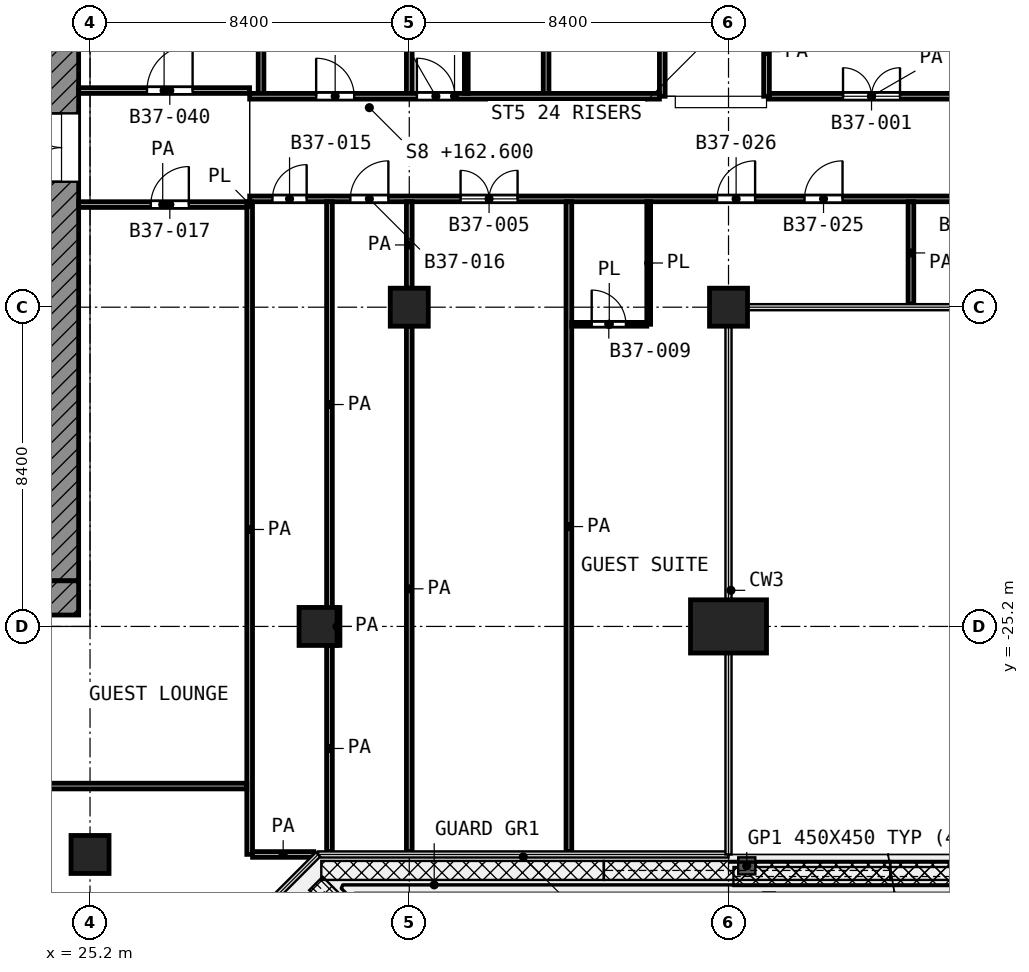
"""IFC4 building model, lengths in metres.
Left out: names, types, materials, properties, quantities, classifications, styles, units other than length and angle.
Written with IfcOpenShell. Run it as: python <this file> out.ifc"""

import sys

from ifc_helpers import new_model, si_unit, direction, frame, frame_2d, origin, origin_2d, place, context, subcontext, project, spatial, rectangle, extrude, element, fill, save


model = new_model("IFC4")
c1 = context("Model", 3, precision=1e-05, world=origin(), true_north=direction((0.0, 1.0)))
c2 = subcontext(c1, "Body", "Model", "MODEL_VIEW")
j1 = project(units=[si_unit("LENGTHUNIT", "METRE"), si_unit("PLANEANGLEUNIT", "RADIAN")], contexts=[c1])
p1 = place(None, origin())
s1 = spatial("IfcSite", under=j1, at=p1, CompositionType="ELEMENT")
p2 = place(p1, origin())
s2 = spatial("IfcBuilding", under=s1, at=p2, CompositionType="ELEMENT")
p3 = place(p2, frame((0.0, 0.0, 162.6)))
s3 = spatial("IfcBuildingStorey", under=s2, at=p3, CompositionType="ELEMENT", Elevation=162.6)
for number, where, z_axis, x_axis in (
    (1, (33.6, -16.8, 0.0), (0.0, 0.0, 1.0), (1.0, 0.0, 0.0)),
    (2, (42.0, -16.8, 0.0), (0.0, 0.0, 1.0), (1.0, 0.0, 0.0)),
    (3, (31.2, -25.2, 0.0), (0.0, 0.0, 1.0), (1.0, 0.0, 0.0)),
):
    element("IfcColumn", number, at=place(p3, frame(where, z_axis=z_axis, x_axis=x_axis)), inside=s3, PredefinedType="COLUMN", context=c2, shape_type="SweptSolid", body=[
        extrude(rectangle(XDim=1.0, YDim=1.0, at=origin_2d()), origin(), (0.0, 0.0, 1.0), 4.2),
    ])
p4 = place(p3, frame((42.0, -25.2, 0.0), z_axis=(0.0, 0.0, 1.0), x_axis=(-1.0, 0.0, 0.0)))
e4 = element("IfcColumn", 4, at=p4, inside=s3, PredefinedType="COLUMN", context=c2, shape_type="SweptSolid", body=[
    extrude(rectangle(XDim=2.0, YDim=1.4, at=origin_2d()), origin(), (0.0, 0.0, 1.0), 4.2),
])
p5 = place(p3, frame((25.2, -31.2, 0.0), z_axis=(0.0, 0.0, 1.0), x_axis=(1.0, 0.0, 0.0)))
e5 = element("IfcColumn", 5, at=p5, inside=s3, PredefinedType="COLUMN", context=c2, shape_type="SweptSolid", body=[
    extrude(rectangle(XDim=1.0, YDim=1.0, at=origin_2d()), origin(), (0.0, 0.0, 1.0), 4.2),
])
p6 = place(p3, frame((24.45, -24.0, 0.0), z_axis=(0.0, 0.0, 1.0), x_axis=(0.0, 1.0, 0.0)))
e6 = element("IfcWall", 6, at=p6, inside=s3, PredefinedType="SHEAR", context=c2, shape_type="SweptSolid", body=[
    extrude(rectangle(XDim=18.6, YDim=0.9, at=frame_2d((9.3, 0.0))), origin(), (0.0, 0.0, 1.0), 3.6),
])
p7 = place(p6, frame((10.5, 0.0, 0.0)))
e7 = element("IfcOpeningElement", 7, at=p7, cuts=e6, PredefinedType="OPENING", context=c2, shape_type="SweptSolid", body=[
    extrude(rectangle(XDim=1.8, YDim=2.1, at=frame_2d((0.9, 1.05))), frame((0.0, 0.46, 0.0), z_axis=(0.0, -1.0, 0.0), x_axis=(1.0, 0.0, 0.0)), (0.0, 0.0, 1.0), 0.92),
])
p8 = place(p3, frame((24.45, -24.9, 0.0), z_axis=(0.0, 0.0, 1.0), x_axis=(0.0, 1.0, 0.0)))
e8 = element("IfcWall", 8, at=p8, inside=s3, PredefinedType="SHEAR", context=c2, shape_type="SweptSolid", body=[
    extrude(rectangle(XDim=0.9, YDim=0.9, at=frame_2d((0.45, 0.0))), origin(), (0.0, 0.0, 1.0), 3.6),
])
p9 = place(p3, frame((37.875, -17.25, 0.0), z_axis=(0.0, 0.0, 1.0), x_axis=(1.0, 0.0, 0.0)))
e9 = element("IfcWall", 9, at=p9, inside=s3, PredefinedType="PARTITIONING", context=c2, shape_type="SweptSolid", body=[
    extrude(rectangle(XDim=1.975, YDim=0.1, at=frame_2d((0.988, 0.0))), origin(), (0.0, 0.0, 1.0), 3.6),
])
p10 = place(p9, frame((0.525, 0.0, 0.0)))
e10 = element("IfcOpeningElement", 10, at=p10, cuts=e9, PredefinedType="OPENING", context=c2, shape_type="SweptSolid", body=[
    extrude(rectangle(XDim=0.9, YDim=2.1, at=frame_2d((0.45, 1.05))), frame((0.0, 0.06, 0.0), z_axis=(0.0, -1.0, 0.0), x_axis=(1.0, 0.0, 0.0)), (0.0, 0.0, 1.0), 0.12),
])
p11 = place(p3, frame((29.4, -14.147, 0.0), z_axis=(0.0, 0.0, 1.0), x_axis=(0.0, 1.0, 0.0)))
e11 = element("IfcWall", 11, at=p11, inside=s3, PredefinedType="PARTITIONING", context=c2, shape_type="SweptSolid", body=[
    extrude(rectangle(XDim=0.12, YDim=0.1, at=frame_2d((0.06, 0.0))), origin(), (0.0, 0.0, 1.0), 3.6),
])
for number, where, z_axis, x_axis in (
    (12, (35.1, -11.175, 0.0), (0.0, 0.0, 1.0), (0.0, 1.0, 0.0)),
    (13, (39.9, -17.25, 0.0), (0.0, 0.0, 1.0), (0.0, 1.0, 0.0)),
):
    element("IfcWall", number, at=place(p3, frame(where, z_axis=z_axis, x_axis=x_axis)), inside=s3, PredefinedType="PARTITIONING", context=c2, shape_type="SweptSolid", body=[
        extrude(rectangle(XDim=3.225, YDim=0.1, at=frame_2d((1.613, 0.0))), origin(), (0.0, 0.0, 1.0), 3.6),
    ])
p12 = place(p3, frame((29.477, -31.2, 0.0), z_axis=(0.0, 0.0, 1.0), x_axis=(1.0, 0.0, 0.0)))
e14 = element("IfcWall", 14, at=p12, inside=s3, PredefinedType="PARTITIONING", context=c2, shape_type="SweptSolid", body=[
    extrude(rectangle(XDim=1.61, YDim=0.15, at=frame_2d((0.805, 0.0))), origin(), (0.0, 0.0, 1.0), 3.6),
])
p13 = place(p3, frame((14.175, -29.4, 0.0), z_axis=(0.0, 0.0, 1.0), x_axis=(1.0, 0.0, 0.0)))
e15 = element("IfcWall", 15, at=p13, inside=s3, PredefinedType="PARTITIONING", context=c2, shape_type="SweptSolid", body=[
    extrude(rectangle(XDim=15.15, YDim=0.15, at=frame_2d((7.575, 0.0))), origin(), (0.0, 0.0, 1.0), 3.6),
])
p14 = place(p3, frame((24.9, -14.1, 0.0), z_axis=(0.0, 0.0, 1.0), x_axis=(1.0, 0.0, 0.0)))
e16 = element("IfcWall", 16, at=p14, inside=s3, PredefinedType="PARTITIONING", context=c2, shape_type="SweptSolid", body=[
    extrude(rectangle(XDim=4.425, YDim=0.15, at=frame_2d((2.212, 0.0))), origin(), (0.0, 0.0, 1.0), 3.6),
])
p15 = place(p14, frame((1.9, 0.0, 0.0)))
e17 = element("IfcOpeningElement", 17, at=p15, cuts=e16, PredefinedType="OPENING", context=c2, shape_type="SweptSolid", body=[
    extrude(rectangle(XDim=1.0, YDim=2.1, at=frame_2d((0.5, 1.05))), frame((0.0, 0.085, 0.0), z_axis=(0.0, -1.0, 0.0), x_axis=(1.0, 0.0, 0.0)), (0.0, 0.0, 1.0), 0.17),
])
p16 = place(p3, frame((29.4, -13.95, 0.0), z_axis=(0.0, 0.0, 1.0), x_axis=(1.0, 0.0, 0.0)))
e18 = element("IfcWall", 18, at=p16, inside=s3, PredefinedType="PARTITIONING", context=c2, shape_type="SweptSolid", body=[
    extrude(rectangle(XDim=37.72, YDim=0.15, at=frame_2d((18.86, 0.0))), origin(), (0.0, 0.0, 1.0), 3.6),
])
p17 = place(p16, frame((14.6, 0.0, 0.0)))
e19 = element("IfcOpeningElement", 19, at=p17, cuts=e18, PredefinedType="OPENING", context=c2, shape_type="SweptSolid", body=[
    extrude(rectangle(XDim=1.0, YDim=2.1, at=frame_2d((0.5, 1.05))), frame((0.0, 0.085, 0.0), z_axis=(0.0, -1.0, 0.0), x_axis=(1.0, 0.0, 0.0)), (0.0, 0.0, 1.0), 0.17),
])
p18 = place(p16, frame((12.3, 0.0, 0.0)))
e20 = element("IfcOpeningElement", 20, at=p18, cuts=e18, PredefinedType="OPENING", context=c2, shape_type="SweptSolid", body=[
    extrude(rectangle(XDim=1.0, YDim=2.1, at=frame_2d((0.5, 1.05))), frame((0.0, 0.085, 0.0), z_axis=(0.0, -1.0, 0.0), x_axis=(1.0, 0.0, 0.0)), (0.0, 0.0, 1.0), 0.17),
])
p19 = place(p16, frame((18.7, 0.0, 0.0)))
e21 = element("IfcOpeningElement", 21, at=p19, cuts=e18, PredefinedType="OPENING", context=c2, shape_type="SweptSolid", body=[
    extrude(rectangle(XDim=1.0, YDim=2.1, at=frame_2d((0.5, 1.05))), frame((0.0, 0.085, 0.0), z_axis=(0.0, -1.0, 0.0), x_axis=(1.0, 0.0, 0.0)), (0.0, 0.0, 1.0), 0.17),
])
p20 = place(p16, frame((22.6, 0.0, 0.0)))
e22 = element("IfcOpeningElement", 22, at=p20, cuts=e18, PredefinedType="OPENING", context=c2, shape_type="SweptSolid", body=[
    extrude(rectangle(XDim=1.0, YDim=2.1, at=frame_2d((0.5, 1.05))), frame((0.0, 0.085, 0.0), z_axis=(0.0, -1.0, 0.0), x_axis=(1.0, 0.0, 0.0)), (0.0, 0.0, 1.0), 0.17),
])
p21 = place(p16, frame((26.8, 0.0, 0.0)))
e23 = element("IfcOpeningElement", 23, at=p21, cuts=e18, PredefinedType="OPENING", context=c2, shape_type="SweptSolid", body=[
    extrude(rectangle(XDim=1.0, YDim=2.1, at=frame_2d((0.5, 1.05))), frame((0.0, 0.085, 0.0), z_axis=(0.0, -1.0, 0.0), x_axis=(1.0, 0.0, 0.0)), (0.0, 0.0, 1.0), 0.17),
])
p22 = place(p16, frame((36.0, 0.0, 0.0)))
e24 = element("IfcOpeningElement", 24, at=p22, cuts=e18, PredefinedType="OPENING", context=c2, shape_type="SweptSolid", body=[
    extrude(rectangle(XDim=1.0, YDim=2.1, at=frame_2d((0.5, 1.05))), frame((0.0, 0.085, 0.0), z_axis=(0.0, -1.0, 0.0), x_axis=(1.0, 0.0, 0.0)), (0.0, 0.0, 1.0), 0.17),
])
p23 = place(p16, frame((34.7, 0.0, 0.0)))
e25 = element("IfcOpeningElement", 25, at=p23, cuts=e18, PredefinedType="OPENING", context=c2, shape_type="SweptSolid", body=[
    extrude(rectangle(XDim=1.0, YDim=2.1, at=frame_2d((0.5, 1.05))), frame((0.0, 0.085, 0.0), z_axis=(0.0, -1.0, 0.0), x_axis=(1.0, 0.0, 0.0)), (0.0, 0.0, 1.0), 0.17),
])
p24 = place(p16, frame((0.6, 0.0, 0.0)))
e26 = element("IfcOpeningElement", 26, at=p24, cuts=e18, PredefinedType="OPENING", context=c2, shape_type="SweptSolid", body=[
    extrude(rectangle(XDim=0.9, YDim=2.1, at=frame_2d((0.45, 1.05))), frame((0.0, 0.085, 0.0), z_axis=(0.0, -1.0, 0.0), x_axis=(1.0, 0.0, 0.0)), (0.0, 0.0, 1.0), 0.17),
])
p25 = place(p16, frame((2.65, 0.0, 0.0)))
e27 = element("IfcOpeningElement", 27, at=p25, cuts=e18, PredefinedType="OPENING", context=c2, shape_type="SweptSolid", body=[
    extrude(rectangle(XDim=1.0, YDim=2.1, at=frame_2d((0.5, 1.05))), frame((0.0, 0.085, 0.0), z_axis=(0.0, -1.0, 0.0), x_axis=(1.0, 0.0, 0.0)), (0.0, 0.0, 1.0), 0.17),
])
p26 = place(p16, frame((5.55, 0.0, 0.0)))
e28 = element("IfcOpeningElement", 28, at=p26, cuts=e18, PredefinedType="OPENING", context=c2, shape_type="SweptSolid", body=[
    extrude(rectangle(XDim=1.5, YDim=2.1, at=frame_2d((0.75, 1.05))), frame((0.0, 0.085, 0.0), z_axis=(0.0, -1.0, 0.0), x_axis=(1.0, 0.0, 0.0)), (0.0, 0.0, 1.0), 0.17),
])
p27 = place(p3, frame((29.4, -11.25, 0.0), z_axis=(0.0, 0.0, 1.0), x_axis=(1.0, 0.0, 0.0)))
e29 = element("IfcWall", 29, at=p27, inside=s3, PredefinedType="PARTITIONING", context=c2, shape_type="SweptSolid", body=[
    extrude(rectangle(XDim=10.782, YDim=0.15, at=frame_2d((5.391, 0.0))), origin(), (0.0, 0.0, 1.0), 3.6),
])
p28 = place(p27, frame((1.75, 0.0, 0.0)))
e30 = element("IfcOpeningElement", 30, at=p28, cuts=e29, PredefinedType="OPENING", context=c2, shape_type="SweptSolid", body=[
    extrude(rectangle(XDim=1.0, YDim=2.1, at=frame_2d((0.5, 1.05))), frame((0.0, 0.085, 0.0), z_axis=(0.0, -1.0, 0.0), x_axis=(1.0, 0.0, 0.0)), (0.0, 0.0, 1.0), 0.17),
])
p29 = place(p27, frame((4.4, 0.0, 0.0)))
e31 = element("IfcOpeningElement", 31, at=p29, cuts=e29, PredefinedType="OPENING", context=c2, shape_type="SweptSolid", body=[
    extrude(rectangle(XDim=1.0, YDim=2.1, at=frame_2d((0.5, 1.05))), frame((0.0, 0.085, 0.0), z_axis=(0.0, -1.0, 0.0), x_axis=(1.0, 0.0, 0.0)), (0.0, 0.0, 1.0), 0.17),
])
p30 = place(p3, frame((43.075, -11.25, 0.0), z_axis=(0.0, 0.0, 1.0), x_axis=(1.0, 0.0, 0.0)))
e32 = element("IfcWall", 32, at=p30, inside=s3, PredefinedType="PARTITIONING", context=c2, shape_type="SweptSolid", body=[
    extrude(rectangle(XDim=5.375, YDim=0.15, at=frame_2d((2.688, 0.0))), origin(), (0.0, 0.0, 1.0), 3.6),
])
p31 = place(p30, frame((1.938, 0.0, 0.0)))
e33 = element("IfcOpeningElement", 33, at=p31, cuts=e32, PredefinedType="OPENING", context=c2, shape_type="SweptSolid", body=[
    extrude(rectangle(XDim=1.5, YDim=2.1, at=frame_2d((0.75, 1.05))), frame((0.0, 0.085, 0.0), z_axis=(0.0, -1.0, 0.0), x_axis=(1.0, 0.0, 0.0)), (0.0, 0.0, 1.0), 0.17),
])
p32 = place(p3, frame((24.9, -11.1, 0.0), z_axis=(0.0, 0.0, 1.0), x_axis=(1.0, 0.0, 0.0)))
e34 = element("IfcWall", 34, at=p32, inside=s3, PredefinedType="PARTITIONING", context=c2, shape_type="SweptSolid", body=[
    extrude(rectangle(XDim=4.498, YDim=0.15, at=frame_2d((2.249, 0.0))), origin(), (0.0, 0.0, 1.0), 3.6),
])
p33 = place(p32, frame((1.799, 0.0, 0.0)))
e35 = element("IfcOpeningElement", 35, at=p33, cuts=e34, PredefinedType="OPENING", context=c2, shape_type="SweptSolid", body=[
    extrude(rectangle(XDim=1.2, YDim=2.1, at=frame_2d((0.6, 1.05))), frame((0.0, 0.085, 0.0), z_axis=(0.0, -1.0, 0.0), x_axis=(1.0, 0.0, 0.0)), (0.0, 0.0, 1.0), 0.17),
])
p34 = place(p3, frame((29.4, -31.198, 0.0), z_axis=(0.0, 0.0, 1.0), x_axis=(0.0, 1.0, 0.0)))
e36 = element("IfcWall", 36, at=p34, inside=s3, PredefinedType="PARTITIONING", context=c2, shape_type="SweptSolid", body=[
    extrude(rectangle(XDim=17.098, YDim=0.15, at=frame_2d((8.549, 0.0))), origin(), (0.0, 0.0, 1.0), 3.6),
])
p35 = place(p3, frame((29.7, -11.175, 0.0), z_axis=(0.0, 0.0, 1.0), x_axis=(0.0, 1.0, 0.0)))
e37 = element("IfcWall", 37, at=p35, inside=s3, PredefinedType="PARTITIONING", context=c2, shape_type="SweptSolid", body=[
    extrude(rectangle(XDim=11.095, YDim=0.15, at=frame_2d((5.547, 0.0))), origin(), (0.0, 0.0, 1.0), 2.7),
])
p36 = place(p3, frame((31.5, -31.12, 0.0), z_axis=(0.0, 0.0, 1.0), x_axis=(0.0, 1.0, 0.0)))
e38 = element("IfcWall", 38, at=p36, inside=s3, PredefinedType="PARTITIONING", context=c2, shape_type="SweptSolid", body=[
    extrude(rectangle(XDim=5.418, YDim=0.15, at=frame_2d((2.709, 0.0))), origin(), (0.0, 0.0, 1.0), 3.6),
])
p37 = place(p3, frame((31.5, -24.698, 0.0), z_axis=(0.0, 0.0, 1.0), x_axis=(0.0, 1.0, 0.0)))
e39 = element("IfcWall", 39, at=p37, inside=s3, PredefinedType="PARTITIONING", context=c2, shape_type="SweptSolid", body=[
    extrude(rectangle(XDim=10.673, YDim=0.15, at=frame_2d((5.336, 0.0))), origin(), (0.0, 0.0, 1.0), 3.6),
])
p38 = place(p3, frame((31.7, -25.698, 0.0), z_axis=(0.0, 0.0, 1.0), x_axis=(0.0, 1.0, 0.0)))
e40 = element("IfcWall", 40, at=p38, inside=s3, PredefinedType="PARTITIONING", context=c2, shape_type="SweptSolid", body=[
    extrude(rectangle(XDim=0.996, YDim=0.15, at=frame_2d((0.498, 0.0))), origin(), (0.0, 0.0, 1.0), 3.6),
])
p39 = place(p3, frame((33.6, -31.12, 0.0), z_axis=(0.0, 0.0, 1.0), x_axis=(0.0, 1.0, 0.0)))
e41 = element("IfcWall", 41, at=p39, inside=s3, PredefinedType="PARTITIONING", context=c2, shape_type="SweptSolid", body=[
    extrude(rectangle(XDim=13.82, YDim=0.15, at=frame_2d((6.91, 0.0))), origin(), (0.0, 0.0, 1.0), 3.6),
])
p40 = place(p3, frame((33.6, -16.3, 0.0), z_axis=(0.0, 0.0, 1.0), x_axis=(0.0, 1.0, 0.0)))
e42 = element("IfcWall", 42, at=p40, inside=s3, PredefinedType="PARTITIONING", context=c2, shape_type="SweptSolid", body=[
    extrude(rectangle(XDim=2.275, YDim=0.15, at=frame_2d((1.138, 0.0))), origin(), (0.0, 0.0, 1.0), 3.6),
])
p41 = place(p3, frame((33.6, -11.175, 0.0), z_axis=(0.0, 0.0, 1.0), x_axis=(0.0, 1.0, 0.0)))
e43 = element("IfcWall", 43, at=p41, inside=s3, PredefinedType="PARTITIONING", context=c2, shape_type="SweptSolid", body=[
    extrude(rectangle(XDim=11.095, YDim=0.15, at=frame_2d((5.547, 0.0))), origin(), (0.0, 0.0, 1.0), 3.6),
])
p42 = place(p3, frame((37.2, -11.175, 0.0), z_axis=(0.0, 0.0, 1.0), x_axis=(0.0, 1.0, 0.0)))
e44 = element("IfcWall", 44, at=p42, inside=s3, PredefinedType="PARTITIONING", context=c2, shape_type="SweptSolid", body=[
    extrude(rectangle(XDim=11.095, YDim=0.15, at=frame_2d((5.547, 0.0))), origin(), (0.0, 0.0, 1.0), 2.7),
])
p43 = place(p3, frame((37.8, -31.12, 0.0), z_axis=(0.0, 0.0, 1.0), x_axis=(0.0, 1.0, 0.0)))
e45 = element("IfcWall", 45, at=p43, inside=s3, PredefinedType="PARTITIONING", context=c2, shape_type="SweptSolid", body=[
    extrude(rectangle(XDim=17.095, YDim=0.15, at=frame_2d((8.548, 0.0))), origin(), (0.0, 0.0, 1.0), 3.6),
])
p44 = place(p3, frame((40.257, -11.25, 0.0), z_axis=(0.0, 0.0, 1.0), x_axis=(0.0, 1.0, 0.0)))
e46 = element("IfcWall", 46, at=p44, inside=s3, PredefinedType="PARTITIONING", context=c2, shape_type="SweptSolid", body=[
    extrude(rectangle(XDim=11.17, YDim=0.15, at=frame_2d((5.585, 0.0))), origin(), (0.0, 0.0, 1.0), 2.7),
])
p45 = place(p44, frame((5.125, 0.0, 0.0)))
e47 = element("IfcOpeningElement", 47, at=p45, cuts=e46, PredefinedType="OPENING", context=c2, shape_type="SweptSolid", body=[
    extrude(rectangle(XDim=1.0, YDim=2.1, at=frame_2d((0.5, 1.05))), frame((0.0, 0.085, 0.0), z_axis=(0.0, -1.0, 0.0), x_axis=(1.0, 0.0, 0.0)), (0.0, 0.0, 1.0), 0.17),
])
p46 = place(p3, frame((43.0, -11.25, 0.0), z_axis=(0.0, 0.0, 1.0), x_axis=(0.0, 1.0, 0.0)))
e48 = element("IfcWall", 48, at=p46, inside=s3, PredefinedType="PARTITIONING", context=c2, shape_type="SweptSolid", body=[
    extrude(rectangle(XDim=2.35, YDim=0.15, at=frame_2d((1.175, 0.0))), origin(), (0.0, 0.0, 1.0), 3.6),
])
p47 = place(p3, frame((46.8, -16.72, 0.0), z_axis=(0.0, 0.0, 1.0), x_axis=(0.0, 1.0, 0.0)))
e49 = element("IfcWall", 49, at=p47, inside=s3, PredefinedType="PARTITIONING", context=c2, shape_type="SweptSolid", body=[
    extrude(rectangle(XDim=2.695, YDim=0.15, at=frame_2d((1.348, 0.0))), origin(), (0.0, 0.0, 1.0), 3.6),
])
p48 = place(p7, origin())
e50 = element("IfcDoor", 50, at=p48, inside=s3, OperationType="DOUBLE_DOOR_SINGLE_SWING", PredefinedType="DOOR", context=c2, shape_type="SweptSolid", body=[
    extrude(rectangle(XDim=1.8, YDim=2.1, at=frame_2d((0.9, 1.05))), frame((0.0, 0.025, 0.0), z_axis=(0.0, -1.0, 0.0), x_axis=(1.0, 0.0, 0.0)), (0.0, 0.0, 1.0), 0.05),
])
fill(e7, e50)
p49 = place(p15, origin())
e51 = element("IfcDoor", 51, at=p49, inside=s3, OperationType="SINGLE_SWING_RIGHT", PredefinedType="DOOR", context=c2, shape_type="SweptSolid", body=[
    extrude(rectangle(XDim=1.0, YDim=2.1, at=frame_2d((0.5, 1.05))), frame((0.0, 0.025, 0.0), z_axis=(0.0, -1.0, 0.0), x_axis=(1.0, 0.0, 0.0)), (0.0, 0.0, 1.0), 0.05),
])
fill(e17, e51)
p50 = place(p33, origin())
e52 = element("IfcDoor", 52, at=p50, inside=s3, OperationType="SINGLE_SWING_RIGHT", PredefinedType="DOOR", context=c2, shape_type="SweptSolid", body=[
    extrude(rectangle(XDim=1.2, YDim=2.1, at=frame_2d((0.6, 1.05))), frame((0.0, 0.025, 0.0), z_axis=(0.0, -1.0, 0.0), x_axis=(1.0, 0.0, 0.0)), (0.0, 0.0, 1.0), 0.05),
])
fill(e35, e52)
p51 = place(p28, origin())
e53 = element("IfcDoor", 53, at=p51, inside=s3, OperationType="SINGLE_SWING_LEFT", PredefinedType="DOOR", context=c2, shape_type="SweptSolid", body=[
    extrude(rectangle(XDim=1.0, YDim=2.1, at=frame_2d((0.5, 1.05))), frame((0.0, 0.025, 0.0), z_axis=(0.0, -1.0, 0.0), x_axis=(1.0, 0.0, 0.0)), (0.0, 0.0, 1.0), 0.05),
])
fill(e30, e53)
p52 = place(p29, origin())
e54 = element("IfcDoor", 54, at=p52, inside=s3, OperationType="SINGLE_SWING_LEFT", PredefinedType="DOOR", context=c2, shape_type="SweptSolid", body=[
    extrude(rectangle(XDim=1.0, YDim=2.1, at=frame_2d((0.5, 1.05))), frame((0.0, 0.025, 0.0), z_axis=(0.0, -1.0, 0.0), x_axis=(1.0, 0.0, 0.0)), (0.0, 0.0, 1.0), 0.05),
])
fill(e31, e54)
p53 = place(p31, origin())
e55 = element("IfcDoor", 55, at=p53, inside=s3, OperationType="DOUBLE_DOOR_SINGLE_SWING", PredefinedType="DOOR", context=c2, shape_type="SweptSolid", body=[
    extrude(rectangle(XDim=1.5, YDim=2.1, at=frame_2d((0.75, 1.05))), frame((0.0, 0.025, 0.0), z_axis=(0.0, -1.0, 0.0), x_axis=(1.0, 0.0, 0.0)), (0.0, 0.0, 1.0), 0.05),
])
fill(e33, e55)
p54 = place(p17, origin())
e56 = element("IfcDoor", 56, at=p54, inside=s3, OperationType="SINGLE_SWING_RIGHT", PredefinedType="DOOR", context=c2, shape_type="SweptSolid", body=[
    extrude(rectangle(XDim=1.0, YDim=2.1, at=frame_2d((0.5, 1.05))), frame((0.0, 0.025, 0.0), z_axis=(0.0, -1.0, 0.0), x_axis=(1.0, 0.0, 0.0)), (0.0, 0.0, 1.0), 0.05),
])
fill(e19, e56)
p55 = place(p18, origin())
e57 = element("IfcDoor", 57, at=p55, inside=s3, OperationType="SINGLE_SWING_RIGHT", PredefinedType="DOOR", context=c2, shape_type="SweptSolid", body=[
    extrude(rectangle(XDim=1.0, YDim=2.1, at=frame_2d((0.5, 1.05))), frame((0.0, 0.025, 0.0), z_axis=(0.0, -1.0, 0.0), x_axis=(1.0, 0.0, 0.0)), (0.0, 0.0, 1.0), 0.05),
])
fill(e20, e57)
p56 = place(p10, origin())
e58 = element("IfcDoor", 58, at=p56, inside=s3, OperationType="SINGLE_SWING_LEFT", PredefinedType="DOOR", context=c2, shape_type="SweptSolid", body=[
    extrude(rectangle(XDim=0.9, YDim=2.1, at=frame_2d((0.45, 1.05))), frame((0.0, 0.025, 0.0), z_axis=(0.0, -1.0, 0.0), x_axis=(1.0, 0.0, 0.0)), (0.0, 0.0, 1.0), 0.05),
])
fill(e10, e58)
p57 = place(p24, origin())
e59 = element("IfcDoor", 59, at=p57, inside=s3, OperationType="SINGLE_SWING_RIGHT", PredefinedType="DOOR", context=c2, shape_type="SweptSolid", body=[
    extrude(rectangle(XDim=0.9, YDim=2.1, at=frame_2d((0.45, 1.05))), frame((0.0, 0.025, 0.0), z_axis=(0.0, -1.0, 0.0), x_axis=(1.0, 0.0, 0.0)), (0.0, 0.0, 1.0), 0.05),
])
fill(e26, e59)
p58 = place(p25, origin())
e60 = element("IfcDoor", 60, at=p58, inside=s3, OperationType="SINGLE_SWING_RIGHT", PredefinedType="DOOR", context=c2, shape_type="SweptSolid", body=[
    extrude(rectangle(XDim=1.0, YDim=2.1, at=frame_2d((0.5, 1.05))), frame((0.0, 0.025, 0.0), z_axis=(0.0, -1.0, 0.0), x_axis=(1.0, 0.0, 0.0)), (0.0, 0.0, 1.0), 0.05),
])
fill(e27, e60)
p59 = place(p26, origin())
e61 = element("IfcDoor", 61, at=p59, inside=s3, OperationType="DOUBLE_DOOR_SINGLE_SWING", PredefinedType="DOOR", context=c2, shape_type="SweptSolid", body=[
    extrude(rectangle(XDim=1.5, YDim=2.1, at=frame_2d((0.75, 1.05))), frame((0.0, 0.025, 0.0), z_axis=(0.0, -1.0, 0.0), x_axis=(1.0, 0.0, 0.0)), (0.0, 0.0, 1.0), 0.05),
])
fill(e28, e61)
save(model, sys.argv[1])
